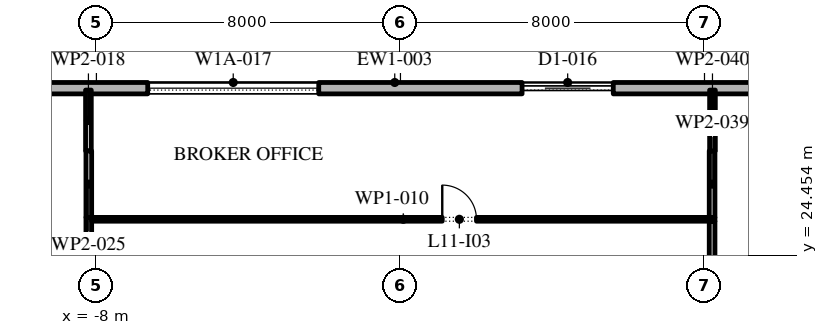
"""IFC4 building model, lengths in metres.
Left out: names, types, materials, properties, quantities, classifications, styles, units other than length and angle.
Written with IfcOpenShell. Run it as: python <this file> out.ifc"""

import sys

from ifc_helpers import new_model, si_unit, direction, frame, frame_2d, origin, place, context, subcontext, project, spatial, rectangle, extrude, element, fill, save


model = new_model("IFC4")
c1 = context("Model", 3, precision=1e-05, world=origin(), true_north=direction((0.0, 1.0)))
c2 = subcontext(c1, "Body", "Model", "MODEL_VIEW")
j1 = project(units=[si_unit("LENGTHUNIT", "METRE"), si_unit("PLANEANGLEUNIT", "RADIAN")], contexts=[c1])
p1 = place(None, origin())
s1 = spatial("IfcSite", under=j1, at=p1, CompositionType="ELEMENT")
p2 = place(p1, origin())
s2 = spatial("IfcBuilding", under=s1, at=p2, CompositionType="ELEMENT")
p3 = place(p2, frame((0.0, 0.0, 56.4)))
s3 = spatial("IfcBuildingStorey", under=s2, at=p3, CompositionType="ELEMENT", Elevation=56.4)
p4 = place(p3, frame((26.1, 28.85, 0.0), z_axis=(0.0, 0.0, 1.0), x_axis=(-1.0, 0.0, 0.0)))
e1 = element("IfcWall", 1, at=p4, inside=s3, PredefinedType="STANDARD", context=c2, shape_type="SweptSolid", body=[
    extrude(rectangle(XDim=52.5, YDim=0.3, at=frame_2d((26.25, 0.0))), origin(), (0.0, 0.0, 1.0), 4.0),
])
p5 = place(p4, frame((2.0, 0.0, 0.45)))
e2 = element("IfcOpeningElement", 2, at=p5, cuts=e1, PredefinedType="OPENING", context=c2, shape_type="SweptSolid", body=[
    extrude(rectangle(XDim=4.5, YDim=3.0, at=frame_2d((2.25, 1.5))), frame((0.0, 0.16, 0.0), z_axis=(0.0, -1.0, 0.0), x_axis=(1.0, 0.0, 0.0)), (0.0, 0.0, 1.0), 0.32),
])
p6 = place(p4, frame((10.65, 0.0, 0.45)))
e3 = element("IfcOpeningElement", 3, at=p6, cuts=e1, PredefinedType="OPENING", context=c2, shape_type="SweptSolid", body=[
    extrude(rectangle(XDim=4.5, YDim=3.0, at=frame_2d((2.25, 1.5))), frame((0.0, 0.16, 0.0), z_axis=(0.0, -1.0, 0.0), x_axis=(1.0, 0.0, 0.0)), (0.0, 0.0, 1.0), 0.32),
])
p7 = place(p4, frame((20.5, 0.0, 0.0)))
e4 = element("IfcOpeningElement", 4, at=p7, cuts=e1, PredefinedType="OPENING", context=c2, shape_type="SweptSolid", body=[
    extrude(rectangle(XDim=2.4, YDim=3.5, at=frame_2d((1.2, 1.75))), frame((0.0, 0.16, 0.0), z_axis=(0.0, -1.0, 0.0), x_axis=(1.0, 0.0, 0.0)), (0.0, 0.0, 1.0), 0.32),
])
p8 = place(p4, frame((28.25, 0.0, 0.45)))
e5 = element("IfcOpeningElement", 5, at=p8, cuts=e1, PredefinedType="OPENING", context=c2, shape_type="SweptSolid", body=[
    extrude(rectangle(XDim=4.5, YDim=3.0, at=frame_2d((2.25, 1.5))), frame((0.0, 0.16, 0.0), z_axis=(0.0, -1.0, 0.0), x_axis=(1.0, 0.0, 0.0)), (0.0, 0.0, 1.0), 0.32),
])
p9 = place(p4, frame((37.05, 0.0, 0.45)))
e6 = element("IfcOpeningElement", 6, at=p9, cuts=e1, PredefinedType="OPENING", context=c2, shape_type="SweptSolid", body=[
    extrude(rectangle(XDim=4.5, YDim=3.0, at=frame_2d((2.25, 1.5))), frame((0.0, 0.16, 0.0), z_axis=(0.0, -1.0, 0.0), x_axis=(1.0, 0.0, 0.0)), (0.0, 0.0, 1.0), 0.32),
])
p10 = place(p4, frame((45.85, 0.0, 0.45)))
e7 = element("IfcOpeningElement", 7, at=p10, cuts=e1, PredefinedType="OPENING", context=c2, shape_type="SweptSolid", body=[
    extrude(rectangle(XDim=4.5, YDim=3.0, at=frame_2d((2.25, 1.5))), frame((0.0, 0.16, 0.0), z_axis=(0.0, -1.0, 0.0), x_axis=(1.0, 0.0, 0.0)), (0.0, 0.0, 1.0), 0.32),
])
p11 = place(p3, frame((-8.21, 28.8, 0.0), z_axis=(0.0, 0.0, 1.0), x_axis=(0.0, -1.0, 0.0)))
e8 = element("IfcWall", 8, at=p11, inside=s3, PredefinedType="PARTITIONING", context=c2, shape_type="SweptSolid", body=[
    extrude(rectangle(XDim=1.6, YDim=0.15, at=frame_2d((0.8, 0.0))), origin(), (0.0, 0.0, 1.0), 4.0),
])
p12 = place(p3, frame((-8.2, 25.45, 0.0), z_axis=(0.0, 0.0, 1.0), x_axis=(0.0, -1.0, 0.0)))
e9 = element("IfcWall", 9, at=p12, inside=s3, PredefinedType="PARTITIONING", context=c2, shape_type="SweptSolid", body=[
    extrude(rectangle(XDim=6.375, YDim=0.15, at=frame_2d((3.188, 0.0))), origin(), (0.0, 0.0, 1.0), 4.0),
])
p13 = place(p3, frame((-8.125, 25.4, 0.0), z_axis=(0.0, 0.0, 1.0), x_axis=(1.0, 0.0, 0.0)))
e10 = element("IfcWall", 10, at=p13, inside=s3, PredefinedType="PARTITIONING", context=c2, shape_type="SweptSolid", body=[
    extrude(rectangle(XDim=16.4, YDim=0.1, at=frame_2d((8.2, 0.0))), origin(), (0.0, 0.0, 1.0), 4.0),
])
p14 = place(p13, frame((9.225, 0.0, 0.0)))
e11 = element("IfcOpeningElement", 11, at=p14, cuts=e10, PredefinedType="OPENING", context=c2, shape_type="SweptSolid", body=[
    extrude(rectangle(XDim=0.9, YDim=2.1, at=frame_2d((0.45, 1.05))), frame((0.0, 0.06, 0.0), z_axis=(0.0, -1.0, 0.0), x_axis=(1.0, 0.0, 0.0)), (0.0, 0.0, 1.0), 0.12),
])
p15 = place(p3, frame((-8.2, 27.2, 0.0), z_axis=(0.0, 0.0, 1.0), x_axis=(0.0, -1.0, 0.0)))
e12 = element("IfcWall", 12, at=p15, inside=s3, PredefinedType="PARTITIONING", context=c2, shape_type="SweptSolid", body=[
    extrude(rectangle(XDim=1.75, YDim=0.15, at=frame_2d((0.875, 0.0))), origin(), (0.0, 0.0, 1.0), 4.0),
])
p16 = place(p3, frame((8.2, 19.075, 0.0), z_axis=(0.0, 0.0, 1.0), x_axis=(0.0, 1.0, 0.0)))
e13 = element("IfcWall", 13, at=p16, inside=s3, PredefinedType="PARTITIONING", context=c2, shape_type="SweptSolid", body=[
    extrude(rectangle(XDim=6.275, YDim=0.15, at=frame_2d((3.138, 0.0))), origin(), (0.0, 0.0, 1.0), 4.0),
])
p17 = place(p3, frame((8.2, 25.45, 0.0), z_axis=(0.0, 0.0, 1.0), x_axis=(0.0, 1.0, 0.0)))
e14 = element("IfcWall", 14, at=p17, inside=s3, PredefinedType="PARTITIONING", context=c2, shape_type="SweptSolid", body=[
    extrude(rectangle(XDim=1.75, YDim=0.15, at=frame_2d((0.875, 0.0))), origin(), (0.0, 0.0, 1.0), 4.0),
])
p18 = place(p3, frame((8.21, 27.2, 0.0), z_axis=(0.0, 0.0, 1.0), x_axis=(0.0, 1.0, 0.0)))
e15 = element("IfcWall", 15, at=p18, inside=s3, PredefinedType="PARTITIONING", context=c2, shape_type="SweptSolid", body=[
    extrude(rectangle(XDim=1.6, YDim=0.15, at=frame_2d((0.8, 0.0))), origin(), (0.0, 0.0, 1.0), 4.0),
])
p19 = place(p7, origin())
e16 = element("IfcDoor", 16, at=p19, inside=s3, OperationType="DOUBLE_DOOR_SLIDING", PredefinedType="DOOR", context=c2, shape_type="SweptSolid", body=[
    extrude(rectangle(XDim=2.4, YDim=3.5, at=frame_2d((1.2, 1.75))), frame((0.0, 0.025, 0.0), z_axis=(0.0, -1.0, 0.0), x_axis=(1.0, 0.0, 0.0)), (0.0, 0.0, 1.0), 0.05),
])
fill(e4, e16)
p20 = place(p8, origin())
e17 = element("IfcWindow", 17, at=p20, inside=s3, PartitioningType="DOUBLE_PANEL_VERTICAL", PredefinedType="WINDOW", context=c2, shape_type="SweptSolid", body=[
    extrude(rectangle(XDim=4.5, YDim=3.0, at=frame_2d((2.25, 1.5))), frame((0.0, 0.03, 0.0), z_axis=(0.0, -1.0, 0.0), x_axis=(1.0, 0.0, 0.0)), (0.0, 0.0, 1.0), 0.06),
])
fill(e5, e17)
p21 = place(p14, origin())
e18 = element("IfcDoor", 18, at=p21, inside=s3, OperationType="SINGLE_SWING_RIGHT", PredefinedType="DOOR", context=c2, shape_type="SweptSolid", body=[
    extrude(rectangle(XDim=0.9, YDim=2.1, at=frame_2d((0.45, 1.05))), frame((0.0, 0.025, 0.0), z_axis=(0.0, -1.0, 0.0), x_axis=(1.0, 0.0, 0.0)), (0.0, 0.0, 1.0), 0.05),
])
fill(e11, e18)
save(model, sys.argv[1])
